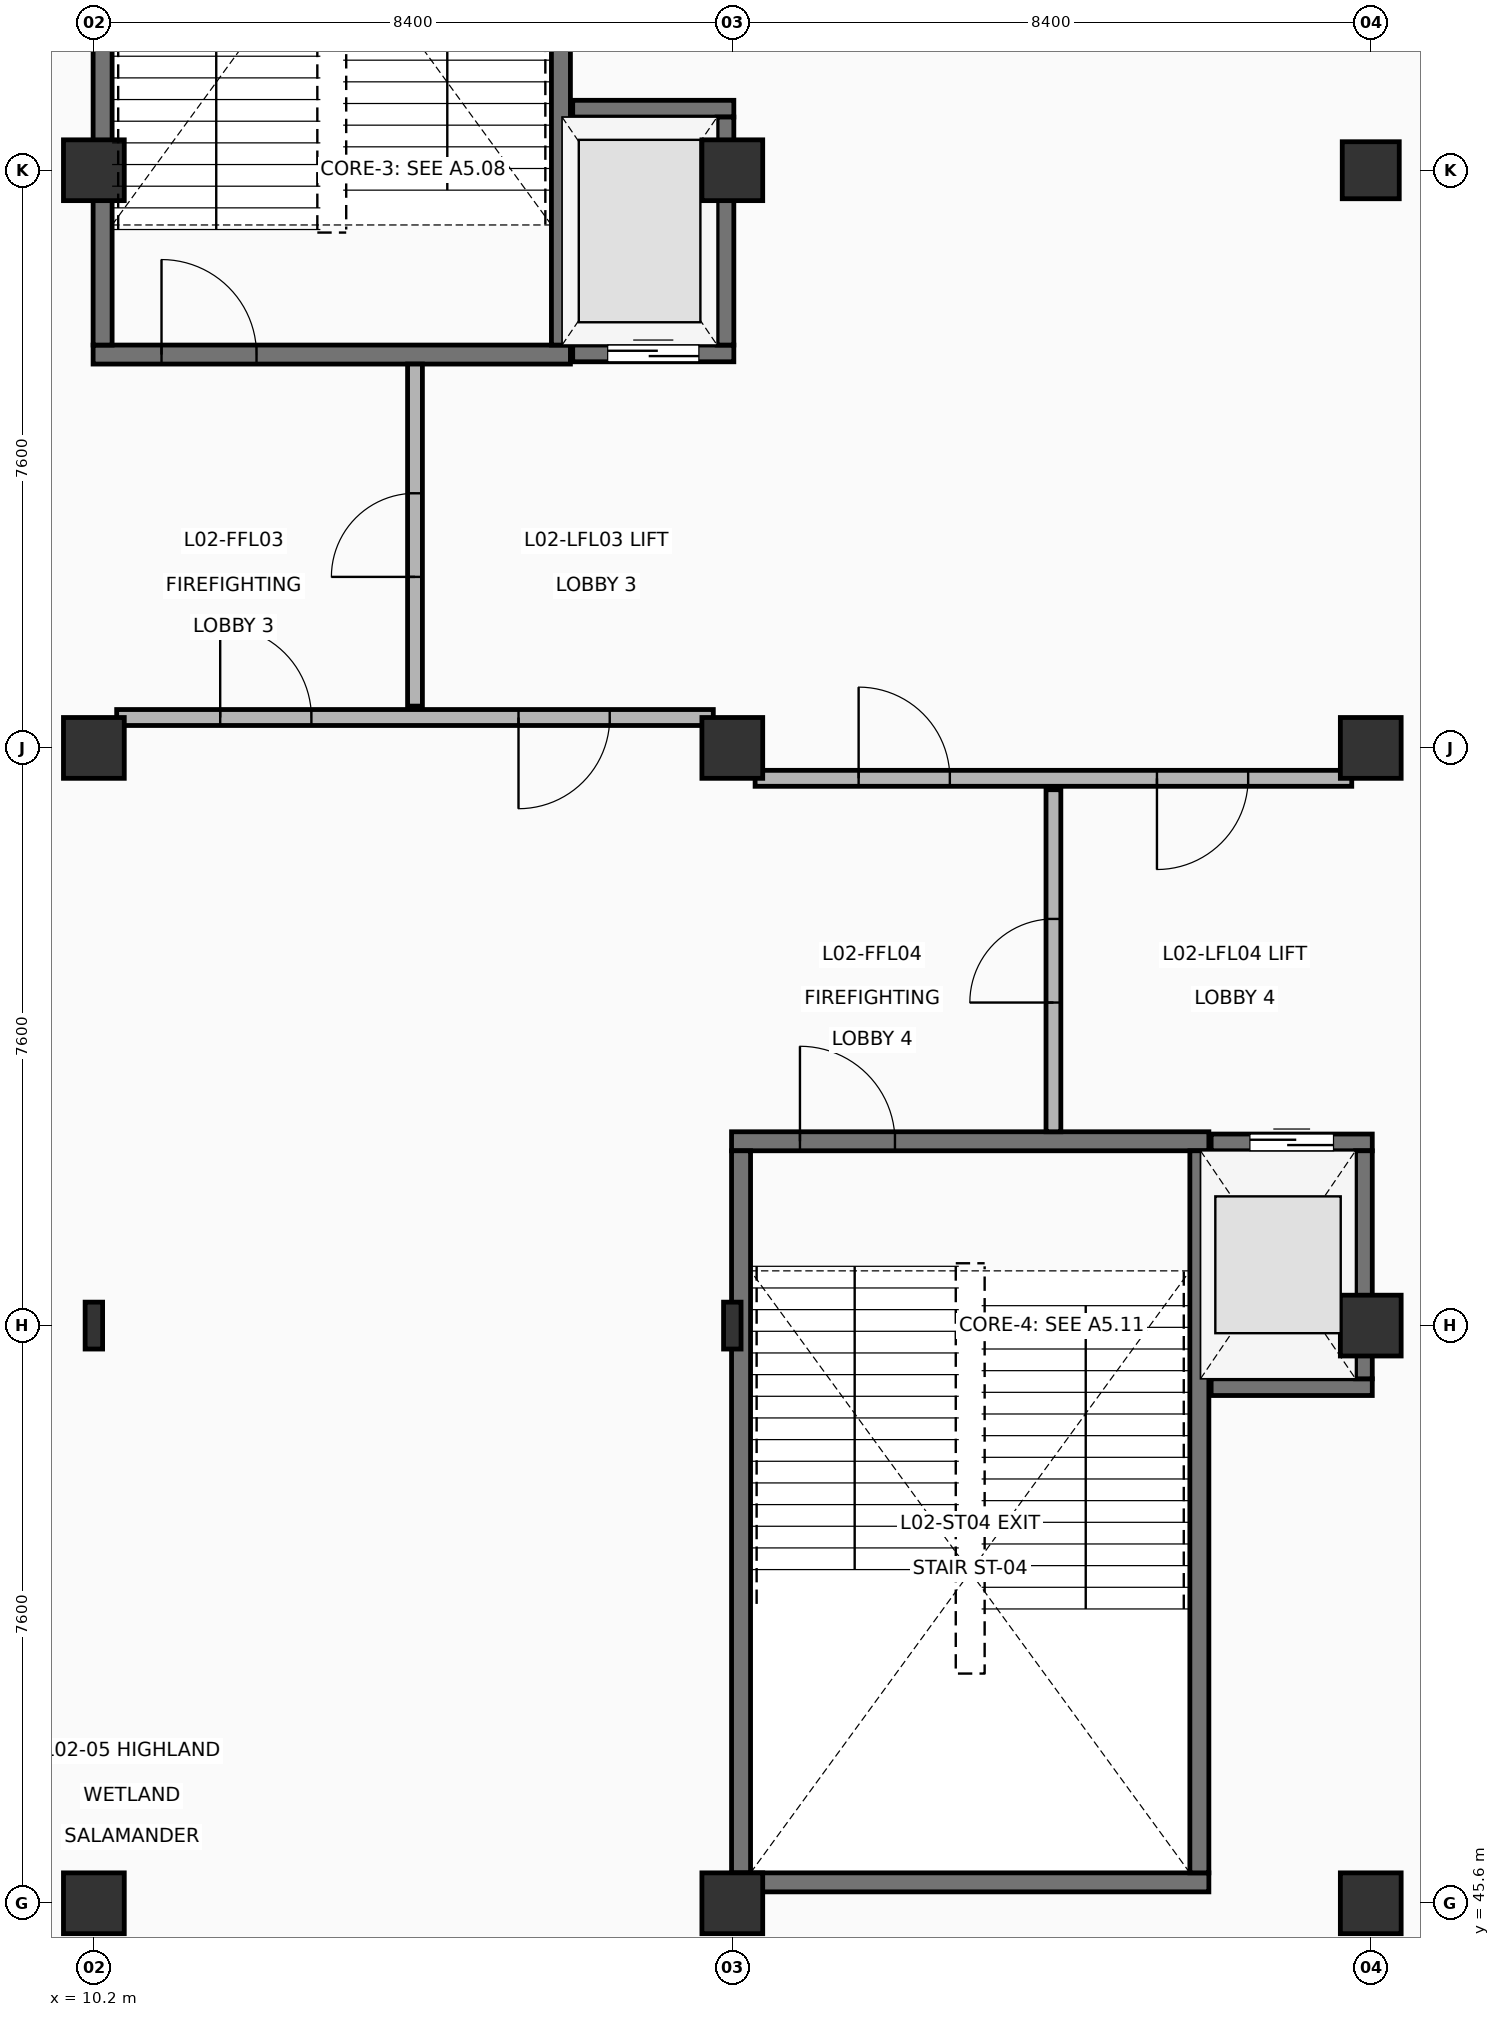
"""IFC4 building model, lengths in metres.
Left out: names, types, materials, properties, quantities, classifications, styles, units other than length and angle.
Written with IfcOpenShell. Run it as: python <this file> out.ifc"""

import sys

from ifc_helpers import new_model, si_unit, direction, frame, frame_2d, origin, origin_2d, place, context, subcontext, project, spatial, rectangle, circle, i_section, extrude, element, fill, save


model = new_model("IFC4")
c1 = context("Model", 3, precision=1e-05, world=origin(), true_north=direction((0.0, 1.0)))
c2 = subcontext(c1, "Body", "Model", "MODEL_VIEW")
j1 = project(units=[si_unit("LENGTHUNIT", "METRE"), si_unit("PLANEANGLEUNIT", "RADIAN")], contexts=[c1])
p1 = place(None, origin())
s1 = spatial("IfcSite", under=j1, at=p1, CompositionType="ELEMENT")
p2 = place(p1, origin())
s2 = spatial("IfcBuilding", under=s1, at=p2, CompositionType="ELEMENT")
p3 = place(p2, frame((0.0, 0.0, 5.4)))
s3 = spatial("IfcBuildingStorey", under=s2, at=p3, CompositionType="ELEMENT", Elevation=5.4)
p4 = place(p3, frame((10.2, 45.6, 0.0), z_axis=(0.0, 0.0, 1.0), x_axis=(1.0, 0.0, 0.0)))
e1 = element("IfcColumn", 1, at=p4, inside=s3, PredefinedType="COLUMN", context=c2, shape_type="SweptSolid", body=[
    extrude(rectangle(XDim=0.8, YDim=0.8, at=origin_2d()), origin(), (0.0, 0.0, 1.0), 5.1),
])
p5 = place(p3, frame((10.2, 53.2, 0.0), z_axis=(0.0, 0.0, 1.0), x_axis=(1.0, 0.0, 0.0)))
e2 = element("IfcColumn", 2, at=p5, inside=s3, PredefinedType="COLUMN", context=c2, shape_type="SweptSolid", body=[
    extrude(i_section(OverallWidth=0.23, OverallDepth=0.617, WebThickness=0.013, FlangeThickness=0.022, at=origin_2d()), origin(), (0.0, 0.0, 1.0), 5.1),
])
for number, where, z_axis, x_axis in (
    (3, (10.2, 60.8, 0.0), (0.0, 0.0, 1.0), (1.0, 0.0, 0.0)),
    (4, (10.2, 68.4, 0.0), (0.0, 0.0, 1.0), (1.0, 0.0, 0.0)),
    (5, (18.6, 45.6, 0.0), (0.0, 0.0, 1.0), (1.0, 0.0, 0.0)),
):
    element("IfcColumn", number, at=place(p3, frame(where, z_axis=z_axis, x_axis=x_axis)), inside=s3, PredefinedType="COLUMN", context=c2, shape_type="SweptSolid", body=[
        extrude(rectangle(XDim=0.8, YDim=0.8, at=origin_2d()), origin(), (0.0, 0.0, 1.0), 5.1),
    ])
p6 = place(p3, frame((18.6, 53.2, 0.0), z_axis=(0.0, 0.0, 1.0), x_axis=(1.0, 0.0, 0.0)))
e6 = element("IfcColumn", 6, at=p6, inside=s3, PredefinedType="COLUMN", context=c2, shape_type="SweptSolid", body=[
    extrude(i_section(OverallWidth=0.23, OverallDepth=0.617, WebThickness=0.013, FlangeThickness=0.022, at=origin_2d()), origin(), (0.0, 0.0, 1.0), 5.1),
])
for number, where, z_axis, x_axis in (
    (7, (18.6, 60.8, 0.0), (0.0, 0.0, 1.0), (1.0, 0.0, 0.0)),
    (8, (18.6, 68.4, 0.0), (0.0, 0.0, 1.0), (1.0, 0.0, 0.0)),
    (9, (27.0, 45.6, 0.0), (0.0, 0.0, 1.0), (1.0, 0.0, 0.0)),
    (10, (27.0, 53.2, 0.0), (0.0, 0.0, 1.0), (1.0, 0.0, 0.0)),
    (11, (27.0, 60.8, 0.0), (0.0, 0.0, 1.0), (1.0, 0.0, 0.0)),
):
    element("IfcColumn", number, at=place(p3, frame(where, z_axis=z_axis, x_axis=x_axis)), inside=s3, PredefinedType="COLUMN", context=c2, shape_type="SweptSolid", body=[
        extrude(rectangle(XDim=0.8, YDim=0.8, at=origin_2d()), origin(), (0.0, 0.0, 1.0), 5.1),
    ])
p7 = place(p3, frame((27.0, 68.4, 0.0), z_axis=(0.0, 0.0, 1.0), x_axis=(1.0, 0.0, 0.0)))
e12 = element("IfcColumn", 12, at=p7, inside=s3, PredefinedType="COLUMN", context=c2, shape_type="SweptSolid", body=[
    extrude(circle(Radius=0.375, at=origin_2d()), origin(), (0.0, 0.0, 1.0), 5.1),
])
p8 = place(p3, frame((10.19, 65.975, 0.0), z_axis=(0.0, 0.0, 1.0), x_axis=(1.0, 0.0, 0.0)))
e13 = element("IfcWall", 13, at=p8, inside=s3, PredefinedType="SHEAR", context=c2, shape_type="SweptSolid", body=[
    extrude(rectangle(XDim=6.28, YDim=0.25, at=frame_2d((3.14, 0.0))), origin(), (0.0, 0.0, 1.0), 4.875),
])
p9 = place(p8, frame((0.9, 0.0, 0.0)))
e14 = element("IfcOpeningElement", 14, at=p9, cuts=e13, PredefinedType="OPENING", context=c2, shape_type="SweptSolid", body=[
    extrude(rectangle(XDim=1.25, YDim=2.2, at=frame_2d((0.625, 1.1))), frame((0.0, 0.135, 0.0), z_axis=(0.0, -1.0, 0.0), x_axis=(1.0, 0.0, 0.0)), (0.0, 0.0, 1.0), 0.27),
])
for number, where, z_axis, x_axis in (
    (15, (10.315, 66.1, 0.0), (0.0, 0.0, 1.0), (0.0, 1.0, 0.0)),
    (16, (16.345, 66.1, 0.0), (0.0, 0.0, 1.0), (0.0, 1.0, 0.0)),
):
    element("IfcWall", number, at=place(p3, frame(where, z_axis=z_axis, x_axis=x_axis)), inside=s3, PredefinedType="SHEAR", context=c2, shape_type="SweptSolid", body=[
        extrude(rectangle(XDim=9.5, YDim=0.25, at=frame_2d((4.75, 0.0))), origin(), (0.0, 0.0, 1.0), 4.875),
    ])
p10 = place(p3, frame((16.5, 65.99, 0.0), z_axis=(0.0, 0.0, 1.0), x_axis=(1.0, 0.0, 0.0)))
e17 = element("IfcWall", 17, at=p10, inside=s3, PredefinedType="SHEAR", context=c2, shape_type="SweptSolid", body=[
    extrude(rectangle(XDim=2.12, YDim=0.22, at=frame_2d((1.06, 0.0))), origin(), (0.0, 0.0, 1.0), 4.875),
])
p11 = place(p10, frame((0.46, 0.0, 0.0)))
e18 = element("IfcOpeningElement", 18, at=p11, cuts=e17, PredefinedType="OPENING", context=c2, shape_type="SweptSolid", body=[
    extrude(rectangle(XDim=1.2, YDim=2.2, at=frame_2d((0.6, 1.1))), frame((0.0, 0.12, 0.0), z_axis=(0.0, -1.0, 0.0), x_axis=(1.0, 0.0, 0.0)), (0.0, 0.0, 1.0), 0.24),
])
p12 = place(p3, frame((16.5, 69.21, 0.0), z_axis=(0.0, 0.0, 1.0), x_axis=(1.0, 0.0, 0.0)))
e19 = element("IfcWall", 19, at=p12, inside=s3, PredefinedType="SHEAR", context=c2, shape_type="SweptSolid", body=[
    extrude(rectangle(XDim=2.12, YDim=0.22, at=frame_2d((1.06, 0.0))), origin(), (0.0, 0.0, 1.0), 4.875),
])
p13 = place(p3, frame((18.51, 66.1, 0.0), z_axis=(0.0, 0.0, 1.0), x_axis=(0.0, 1.0, 0.0)))
e20 = element("IfcWall", 20, at=p13, inside=s3, PredefinedType="SHEAR", context=c2, shape_type="SweptSolid", body=[
    extrude(rectangle(XDim=3.0, YDim=0.22, at=frame_2d((1.5, 0.0))), origin(), (0.0, 0.0, 1.0), 4.875),
])
p14 = place(p3, frame((10.5, 61.2, 0.0), z_axis=(0.0, 0.0, 1.0), x_axis=(1.0, 0.0, 0.0)))
e21 = element("IfcWall", 21, at=p14, inside=s3, PredefinedType="PARTITIONING", context=c2, shape_type="SweptSolid", body=[
    extrude(rectangle(XDim=7.85, YDim=0.21, at=frame_2d((3.925, 0.0))), origin(), (0.0, 0.0, 1.0), 4.875),
])
p15 = place(p14, frame((1.362, 0.0, 0.0)))
e22 = element("IfcOpeningElement", 22, at=p15, cuts=e21, PredefinedType="OPENING", context=c2, shape_type="SweptSolid", body=[
    extrude(rectangle(XDim=1.2, YDim=2.2, at=frame_2d((0.6, 1.1))), frame((0.0, 0.115, 0.0), z_axis=(0.0, -1.0, 0.0), x_axis=(1.0, 0.0, 0.0)), (0.0, 0.0, 1.0), 0.23),
])
p16 = place(p14, frame((5.287, 0.0, 0.0)))
e23 = element("IfcOpeningElement", 23, at=p16, cuts=e21, PredefinedType="OPENING", context=c2, shape_type="SweptSolid", body=[
    extrude(rectangle(XDim=1.2, YDim=2.2, at=frame_2d((0.6, 1.1))), frame((0.0, 0.115, 0.0), z_axis=(0.0, -1.0, 0.0), x_axis=(1.0, 0.0, 0.0)), (0.0, 0.0, 1.0), 0.23),
])
p17 = place(p3, frame((14.425, 61.35, 0.0), z_axis=(0.0, 0.0, 1.0), x_axis=(0.0, 1.0, 0.0)))
e24 = element("IfcWall", 24, at=p17, inside=s3, PredefinedType="PARTITIONING", context=c2, shape_type="SweptSolid", body=[
    extrude(rectangle(XDim=4.5, YDim=0.195, at=frame_2d((2.25, 0.0))), origin(), (0.0, 0.0, 1.0), 4.875),
])
p18 = place(p17, frame((1.7, 0.0, 0.0)))
e25 = element("IfcOpeningElement", 25, at=p18, cuts=e24, PredefinedType="OPENING", context=c2, shape_type="SweptSolid", body=[
    extrude(rectangle(XDim=1.1, YDim=2.15, at=frame_2d((0.55, 1.075))), frame((0.0, 0.107, 0.0), z_axis=(0.0, -1.0, 0.0), x_axis=(1.0, 0.0, 0.0)), (0.0, 0.0, 1.0), 0.215),
])
p19 = place(p3, frame((18.59, 45.875, 0.0), z_axis=(0.0, 0.0, 1.0), x_axis=(1.0, 0.0, 0.0)))
e26 = element("IfcWall", 26, at=p19, inside=s3, PredefinedType="SHEAR", context=c2, shape_type="SweptSolid", body=[
    extrude(rectangle(XDim=6.28, YDim=0.25, at=frame_2d((3.14, 0.0))), origin(), (0.0, 0.0, 1.0), 4.875),
])
p20 = place(p3, frame((18.59, 55.625, 0.0), z_axis=(0.0, 0.0, 1.0), x_axis=(1.0, 0.0, 0.0)))
e27 = element("IfcWall", 27, at=p20, inside=s3, PredefinedType="SHEAR", context=c2, shape_type="SweptSolid", body=[
    extrude(rectangle(XDim=6.28, YDim=0.25, at=frame_2d((3.14, 0.0))), origin(), (0.0, 0.0, 1.0), 4.875),
])
p21 = place(p20, frame((0.9, 0.0, 0.0)))
e28 = element("IfcOpeningElement", 28, at=p21, cuts=e27, PredefinedType="OPENING", context=c2, shape_type="SweptSolid", body=[
    extrude(rectangle(XDim=1.25, YDim=2.2, at=frame_2d((0.625, 1.1))), frame((0.0, 0.135, 0.0), z_axis=(0.0, -1.0, 0.0), x_axis=(1.0, 0.0, 0.0)), (0.0, 0.0, 1.0), 0.27),
])
for number, where, z_axis, x_axis in (
    (29, (18.715, 46.0, 0.0), (0.0, 0.0, 1.0), (0.0, 1.0, 0.0)),
    (30, (24.745, 46.0, 0.0), (0.0, 0.0, 1.0), (0.0, 1.0, 0.0)),
):
    element("IfcWall", number, at=place(p3, frame(where, z_axis=z_axis, x_axis=x_axis)), inside=s3, PredefinedType="SHEAR", context=c2, shape_type="SweptSolid", body=[
        extrude(rectangle(XDim=9.5, YDim=0.25, at=frame_2d((4.75, 0.0))), origin(), (0.0, 0.0, 1.0), 4.875),
    ])
p22 = place(p3, frame((24.9, 52.39, 0.0), z_axis=(0.0, 0.0, 1.0), x_axis=(1.0, 0.0, 0.0)))
e31 = element("IfcWall", 31, at=p22, inside=s3, PredefinedType="SHEAR", context=c2, shape_type="SweptSolid", body=[
    extrude(rectangle(XDim=2.12, YDim=0.22, at=frame_2d((1.06, 0.0))), origin(), (0.0, 0.0, 1.0), 4.875),
])
p23 = place(p3, frame((24.9, 55.61, 0.0), z_axis=(0.0, 0.0, 1.0), x_axis=(1.0, 0.0, 0.0)))
e32 = element("IfcWall", 32, at=p23, inside=s3, PredefinedType="SHEAR", context=c2, shape_type="SweptSolid", body=[
    extrude(rectangle(XDim=2.12, YDim=0.22, at=frame_2d((1.06, 0.0))), origin(), (0.0, 0.0, 1.0), 4.875),
])
p24 = place(p23, frame((0.51, 0.0, 0.0)))
e33 = element("IfcOpeningElement", 33, at=p24, cuts=e32, PredefinedType="OPENING", context=c2, shape_type="SweptSolid", body=[
    extrude(rectangle(XDim=1.1, YDim=2.15, at=frame_2d((0.55, 1.075))), frame((0.0, 0.12, 0.0), z_axis=(0.0, -1.0, 0.0), x_axis=(1.0, 0.0, 0.0)), (0.0, 0.0, 1.0), 0.24),
])
p25 = place(p3, frame((26.91, 52.5, 0.0), z_axis=(0.0, 0.0, 1.0), x_axis=(0.0, 1.0, 0.0)))
e34 = element("IfcWall", 34, at=p25, inside=s3, PredefinedType="SHEAR", context=c2, shape_type="SweptSolid", body=[
    extrude(rectangle(XDim=3.0, YDim=0.22, at=frame_2d((1.5, 0.0))), origin(), (0.0, 0.0, 1.0), 4.875),
])
p26 = place(p3, frame((18.9, 60.4, 0.0), z_axis=(0.0, 0.0, 1.0), x_axis=(1.0, 0.0, 0.0)))
e35 = element("IfcWall", 35, at=p26, inside=s3, PredefinedType="PARTITIONING", context=c2, shape_type="SweptSolid", body=[
    extrude(rectangle(XDim=7.85, YDim=0.21, at=frame_2d((3.925, 0.0))), origin(), (0.0, 0.0, 1.0), 4.875),
])
p27 = place(p26, frame((1.362, 0.0, 0.0)))
e36 = element("IfcOpeningElement", 36, at=p27, cuts=e35, PredefinedType="OPENING", context=c2, shape_type="SweptSolid", body=[
    extrude(rectangle(XDim=1.2, YDim=2.2, at=frame_2d((0.6, 1.1))), frame((0.0, 0.115, 0.0), z_axis=(0.0, -1.0, 0.0), x_axis=(1.0, 0.0, 0.0)), (0.0, 0.0, 1.0), 0.23),
])
p28 = place(p26, frame((5.287, 0.0, 0.0)))
e37 = element("IfcOpeningElement", 37, at=p28, cuts=e35, PredefinedType="OPENING", context=c2, shape_type="SweptSolid", body=[
    extrude(rectangle(XDim=1.2, YDim=2.2, at=frame_2d((0.6, 1.1))), frame((0.0, 0.115, 0.0), z_axis=(0.0, -1.0, 0.0), x_axis=(1.0, 0.0, 0.0)), (0.0, 0.0, 1.0), 0.23),
])
p29 = place(p3, frame((22.825, 55.75, 0.0), z_axis=(0.0, 0.0, 1.0), x_axis=(0.0, 1.0, 0.0)))
e38 = element("IfcWall", 38, at=p29, inside=s3, PredefinedType="PARTITIONING", context=c2, shape_type="SweptSolid", body=[
    extrude(rectangle(XDim=4.5, YDim=0.195, at=frame_2d((2.25, 0.0))), origin(), (0.0, 0.0, 1.0), 4.875),
])
p30 = place(p29, frame((1.7, 0.0, 0.0)))
e39 = element("IfcOpeningElement", 39, at=p30, cuts=e38, PredefinedType="OPENING", context=c2, shape_type="SweptSolid", body=[
    extrude(rectangle(XDim=1.1, YDim=2.15, at=frame_2d((0.55, 1.075))), frame((0.0, 0.107, 0.0), z_axis=(0.0, -1.0, 0.0), x_axis=(1.0, 0.0, 0.0)), (0.0, 0.0, 1.0), 0.215),
])
p31 = place(p9, origin())
e40 = element("IfcDoor", 40, at=p31, inside=s3, OperationType="SINGLE_SWING_LEFT", PredefinedType="DOOR", context=c2, shape_type="SweptSolid", body=[
    extrude(rectangle(XDim=1.25, YDim=2.2, at=frame_2d((0.625, 1.1))), frame((0.0, 0.025, 0.0), z_axis=(0.0, -1.0, 0.0), x_axis=(1.0, 0.0, 0.0)), (0.0, 0.0, 1.0), 0.05),
])
fill(e14, e40)
p32 = place(p11, origin())
e41 = element("IfcDoor", 41, at=p32, inside=s3, OperationType="DOUBLE_DOOR_SLIDING", PredefinedType="DOOR", context=c2, shape_type="SweptSolid", body=[
    extrude(rectangle(XDim=1.2, YDim=2.2, at=frame_2d((0.6, 1.1))), frame((0.0, 0.025, 0.0), z_axis=(0.0, -1.0, 0.0), x_axis=(1.0, 0.0, 0.0)), (0.0, 0.0, 1.0), 0.05),
])
fill(e18, e41)
p33 = place(p15, origin())
e42 = element("IfcDoor", 42, at=p33, inside=s3, OperationType="SINGLE_SWING_LEFT", PredefinedType="DOOR", context=c2, shape_type="SweptSolid", body=[
    extrude(rectangle(XDim=1.2, YDim=2.2, at=frame_2d((0.6, 1.1))), frame((0.0, 0.025, 0.0), z_axis=(0.0, -1.0, 0.0), x_axis=(1.0, 0.0, 0.0)), (0.0, 0.0, 1.0), 0.05),
])
fill(e22, e42)
p34 = place(p16, origin())
e43 = element("IfcDoor", 43, at=p34, inside=s3, OperationType="SINGLE_SWING_RIGHT", PredefinedType="DOOR", context=c2, shape_type="SweptSolid", body=[
    extrude(rectangle(XDim=1.2, YDim=2.2, at=frame_2d((0.6, 1.1))), frame((0.0, 0.025, 0.0), z_axis=(0.0, -1.0, 0.0), x_axis=(1.0, 0.0, 0.0)), (0.0, 0.0, 1.0), 0.05),
])
fill(e23, e43)
p35 = place(p18, origin())
e44 = element("IfcDoor", 44, at=p35, inside=s3, OperationType="SINGLE_SWING_LEFT", PredefinedType="DOOR", context=c2, shape_type="SweptSolid", body=[
    extrude(rectangle(XDim=1.1, YDim=2.15, at=frame_2d((0.55, 1.075))), frame((0.0, 0.025, 0.0), z_axis=(0.0, -1.0, 0.0), x_axis=(1.0, 0.0, 0.0)), (0.0, 0.0, 1.0), 0.05),
])
fill(e25, e44)
p36 = place(p21, origin())
e45 = element("IfcDoor", 45, at=p36, inside=s3, OperationType="SINGLE_SWING_LEFT", PredefinedType="DOOR", context=c2, shape_type="SweptSolid", body=[
    extrude(rectangle(XDim=1.25, YDim=2.2, at=frame_2d((0.625, 1.1))), frame((0.0, 0.025, 0.0), z_axis=(0.0, -1.0, 0.0), x_axis=(1.0, 0.0, 0.0)), (0.0, 0.0, 1.0), 0.05),
])
fill(e28, e45)
p37 = place(p24, origin())
e46 = element("IfcDoor", 46, at=p37, inside=s3, OperationType="DOUBLE_DOOR_SLIDING", PredefinedType="DOOR", context=c2, shape_type="SweptSolid", body=[
    extrude(rectangle(XDim=1.1, YDim=2.15, at=frame_2d((0.55, 1.075))), frame((0.0, 0.025, 0.0), z_axis=(0.0, -1.0, 0.0), x_axis=(1.0, 0.0, 0.0)), (0.0, 0.0, 1.0), 0.05),
])
fill(e33, e46)
p38 = place(p27, origin())
e47 = element("IfcDoor", 47, at=p38, inside=s3, OperationType="SINGLE_SWING_LEFT", PredefinedType="DOOR", context=c2, shape_type="SweptSolid", body=[
    extrude(rectangle(XDim=1.2, YDim=2.2, at=frame_2d((0.6, 1.1))), frame((0.0, 0.025, 0.0), z_axis=(0.0, -1.0, 0.0), x_axis=(1.0, 0.0, 0.0)), (0.0, 0.0, 1.0), 0.05),
])
fill(e36, e47)
p39 = place(p28, origin())
e48 = element("IfcDoor", 48, at=p39, inside=s3, OperationType="SINGLE_SWING_RIGHT", PredefinedType="DOOR", context=c2, shape_type="SweptSolid", body=[
    extrude(rectangle(XDim=1.2, YDim=2.2, at=frame_2d((0.6, 1.1))), frame((0.0, 0.025, 0.0), z_axis=(0.0, -1.0, 0.0), x_axis=(1.0, 0.0, 0.0)), (0.0, 0.0, 1.0), 0.05),
])
fill(e37, e48)
p40 = place(p30, origin())
e49 = element("IfcDoor", 49, at=p40, inside=s3, OperationType="SINGLE_SWING_LEFT", PredefinedType="DOOR", context=c2, shape_type="SweptSolid", body=[
    extrude(rectangle(XDim=1.1, YDim=2.15, at=frame_2d((0.55, 1.075))), frame((0.0, 0.025, 0.0), z_axis=(0.0, -1.0, 0.0), x_axis=(1.0, 0.0, 0.0)), (0.0, 0.0, 1.0), 0.05),
])
fill(e39, e49)
save(model, sys.argv[1])
